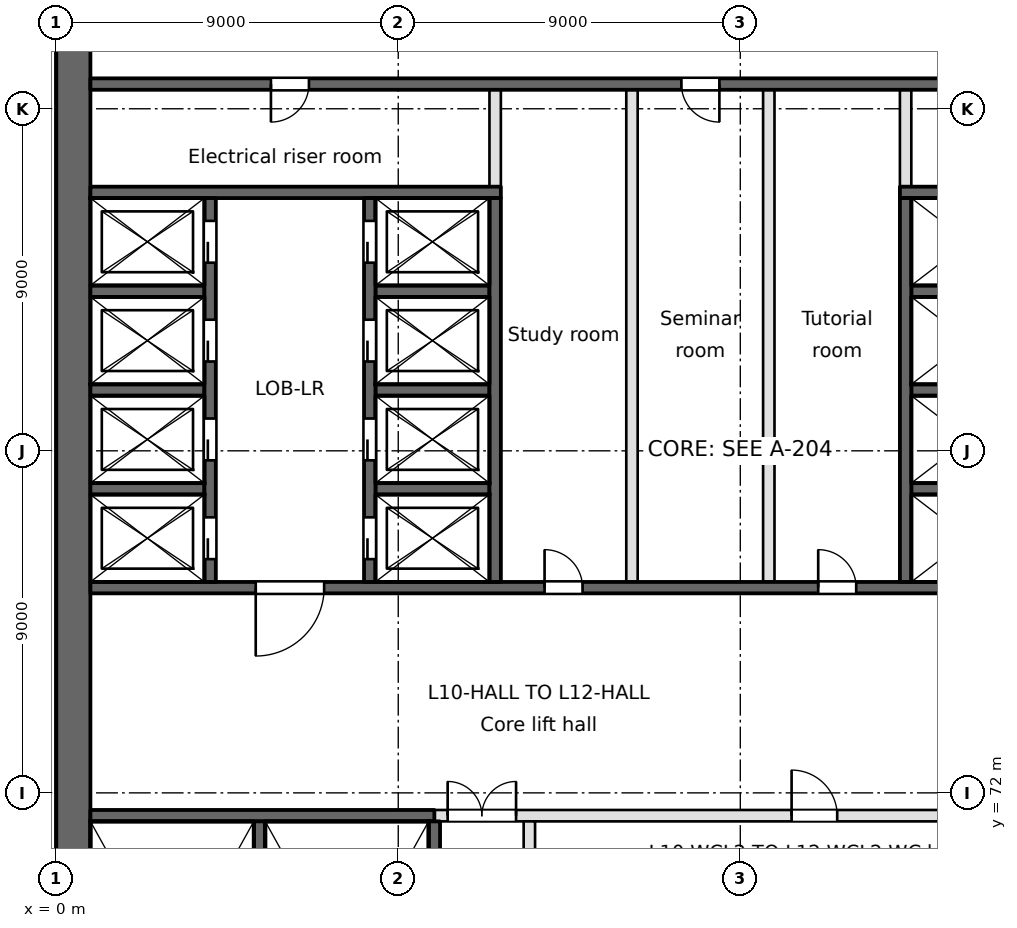
"""IFC4 building model, lengths in metres.
Left out: names, types, materials, properties, quantities, classifications, styles, units other than length and angle.
Written with IfcOpenShell. Run it as: python <this file> out.ifc"""

import sys

from ifc_helpers import new_model, si_unit, direction, frame, frame_2d, origin, place, context, subcontext, project, spatial, rectangle, extrude, element, fill, save


model = new_model("IFC4")
c1 = context("Model", 3, precision=1e-05, world=origin(), true_north=direction((0.0, 1.0)))
c2 = subcontext(c1, "Body", "Model", "MODEL_VIEW")
j1 = project(units=[si_unit("LENGTHUNIT", "METRE"), si_unit("PLANEANGLEUNIT", "RADIAN")], contexts=[c1])
p1 = place(None, origin())
s1 = spatial("IfcSite", under=j1, at=p1, CompositionType="ELEMENT")
p2 = place(p1, origin())
s2 = spatial("IfcBuilding", under=s1, at=p2, CompositionType="ELEMENT")
p3 = place(p2, frame((0.0, 0.0, 46.9)))
s3 = spatial("IfcBuildingStorey", under=s2, at=p3, CompositionType="ELEMENT", Elevation=46.9)
p4 = place(p3, frame((0.45, 94.5, 0.0), z_axis=(0.0, 0.0, 1.0), x_axis=(0.0, -1.0, 0.0)))
e1 = element("IfcWall", 1, at=p4, inside=s3, PredefinedType="SHEAR", context=c2, shape_type="SweptSolid", body=[
    extrude(rectangle(XDim=66.187, YDim=0.9, at=frame_2d((33.094, 0.0))), origin(), (0.0, 0.0, 1.0), 3.7),
])
p5 = place(p3, frame((0.9, 71.4, -0.4), z_axis=(0.0, 0.0, 1.0), x_axis=(1.0, 0.0, 0.0)))
e2 = element("IfcWall", 2, at=p5, inside=s3, PredefinedType="SOLIDWALL", context=c2, shape_type="SweptSolid", body=[
    extrude(rectangle(XDim=9.05, YDim=0.3, at=frame_2d((4.525, 0.0))), origin(), (0.0, 0.0, 1.0), 3.7),
])
p6 = place(p3, frame((9.95, 71.4, 0.0), z_axis=(0.0, 0.0, 1.0), x_axis=(1.0, 0.0, 0.0)))
e3 = element("IfcWall", 3, at=p6, inside=s3, PredefinedType="PARTITIONING", context=c2, shape_type="SweptSolid", body=[
    extrude(rectangle(XDim=17.65, YDim=0.3, at=frame_2d((8.825, 0.0))), origin(), (0.0, 0.0, 1.0), 3.3),
])
p7 = place(p6, frame((0.35, 0.0, 0.0)))
e4 = element("IfcOpeningElement", 4, at=p7, cuts=e3, PredefinedType="OPENING", context=c2, shape_type="SweptSolid", body=[
    extrude(rectangle(XDim=1.8, YDim=2.1, at=frame_2d((0.9, 1.05))), frame((0.0, 0.15, 0.0), z_axis=(0.0, -1.0, 0.0), x_axis=(1.0, 0.0, 0.0)), (0.0, 0.0, 1.0), 0.3),
])
p8 = place(p6, frame((9.4, 0.0, 0.0)))
e5 = element("IfcOpeningElement", 5, at=p8, cuts=e3, PredefinedType="OPENING", context=c2, shape_type="SweptSolid", body=[
    extrude(rectangle(XDim=1.2, YDim=2.1, at=frame_2d((0.6, 1.05))), frame((0.0, 0.15, 0.0), z_axis=(0.0, -1.0, 0.0), x_axis=(1.0, 0.0, 0.0)), (0.0, 0.0, 1.0), 0.3),
])
p9 = place(p3, frame((0.9, 77.4, -0.4), z_axis=(0.0, 0.0, 1.0), x_axis=(1.0, 0.0, 0.0)))
e6 = element("IfcWall", 6, at=p9, inside=s3, PredefinedType="SOLIDWALL", context=c2, shape_type="SweptSolid", body=[
    extrude(rectangle(XDim=28.95, YDim=0.3, at=frame_2d((14.475, 0.0))), origin(), (0.0, 0.0, 1.0), 3.7),
])
p10 = place(p9, frame((4.35, 0.0, 0.4)))
e7 = element("IfcOpeningElement", 7, at=p10, cuts=e6, PredefinedType="OPENING", context=c2, shape_type="SweptSolid", body=[
    extrude(rectangle(XDim=1.8, YDim=2.1, at=frame_2d((0.9, 1.05))), frame((0.0, 0.15, 0.0), z_axis=(0.0, -1.0, 0.0), x_axis=(1.0, 0.0, 0.0)), (0.0, 0.0, 1.0), 0.3),
])
p11 = place(p9, frame((25.95, 0.0, 0.4)))
e8 = element("IfcOpeningElement", 8, at=p11, cuts=e6, PredefinedType="OPENING", context=c2, shape_type="SweptSolid", body=[
    extrude(rectangle(XDim=1.8, YDim=2.1, at=frame_2d((0.9, 1.05))), frame((0.0, 0.15, 0.0), z_axis=(0.0, -1.0, 0.0), x_axis=(1.0, 0.0, 0.0)), (0.0, 0.0, 1.0), 0.3),
])
p12 = place(p9, frame((11.95, 0.0, 0.4)))
e9 = element("IfcOpeningElement", 9, at=p12, cuts=e6, PredefinedType="OPENING", context=c2, shape_type="SweptSolid", body=[
    extrude(rectangle(XDim=1.0, YDim=2.1, at=frame_2d((0.5, 1.05))), frame((0.0, 0.15, 0.0), z_axis=(0.0, -1.0, 0.0), x_axis=(1.0, 0.0, 0.0)), (0.0, 0.0, 1.0), 0.3),
])
p13 = place(p9, frame((19.15, 0.0, 0.4)))
e10 = element("IfcOpeningElement", 10, at=p13, cuts=e6, PredefinedType="OPENING", context=c2, shape_type="SweptSolid", body=[
    extrude(rectangle(XDim=1.0, YDim=2.1, at=frame_2d((0.5, 1.05))), frame((0.0, 0.15, 0.0), z_axis=(0.0, -1.0, 0.0), x_axis=(1.0, 0.0, 0.0)), (0.0, 0.0, 1.0), 0.3),
])
for number, where, z_axis, x_axis in (
    (11, (0.9, 80.0, -0.4), (0.0, 0.0, 1.0), (1.0, 0.0, 0.0)),
    (12, (8.4, 80.0, -0.4), (0.0, 0.0, 1.0), (1.0, 0.0, 0.0)),
    (13, (22.5, 80.0, -0.4), (0.0, 0.0, 1.0), (1.0, 0.0, 0.0)),
    (14, (0.9, 82.6, -0.4), (0.0, 0.0, 1.0), (1.0, 0.0, 0.0)),
    (15, (8.4, 82.6, -0.4), (0.0, 0.0, 1.0), (1.0, 0.0, 0.0)),
    (16, (22.5, 82.6, -0.4), (0.0, 0.0, 1.0), (1.0, 0.0, 0.0)),
    (17, (0.9, 85.2, -0.4), (0.0, 0.0, 1.0), (1.0, 0.0, 0.0)),
    (18, (8.4, 85.2, -0.4), (0.0, 0.0, 1.0), (1.0, 0.0, 0.0)),
    (19, (22.5, 85.2, -0.4), (0.0, 0.0, 1.0), (1.0, 0.0, 0.0)),
):
    element("IfcWall", number, at=place(p3, frame(where, z_axis=z_axis, x_axis=x_axis)), inside=s3, PredefinedType="SOLIDWALL", context=c2, shape_type="SweptSolid", body=[
        extrude(rectangle(XDim=3.0, YDim=0.3, at=frame_2d((1.5, 0.0))), origin(), (0.0, 0.0, 1.0), 3.7),
    ])
p14 = place(p3, frame((0.9, 87.8, -0.4), z_axis=(0.0, 0.0, 1.0), x_axis=(1.0, 0.0, 0.0)))
e20 = element("IfcWall", 20, at=p14, inside=s3, PredefinedType="SOLIDWALL", context=c2, shape_type="SweptSolid", body=[
    extrude(rectangle(XDim=10.8, YDim=0.3, at=frame_2d((5.4, 0.0))), origin(), (0.0, 0.0, 1.0), 3.7),
])
p15 = place(p3, frame((22.2, 87.8, -0.4), z_axis=(0.0, 0.0, 1.0), x_axis=(1.0, 0.0, 0.0)))
e21 = element("IfcWall", 21, at=p15, inside=s3, PredefinedType="SOLIDWALL", context=c2, shape_type="SweptSolid", body=[
    extrude(rectangle(XDim=7.8, YDim=0.3, at=frame_2d((3.9, 0.0))), origin(), (0.0, 0.0, 1.0), 3.7),
])
p16 = place(p3, frame((0.9, 90.65, -0.4), z_axis=(0.0, 0.0, 1.0), x_axis=(1.0, 0.0, 0.0)))
e22 = element("IfcWall", 22, at=p16, inside=s3, PredefinedType="SOLIDWALL", context=c2, shape_type="SweptSolid", body=[
    extrude(rectangle(XDim=34.6, YDim=0.3, at=frame_2d((17.3, 0.0))), origin(), (0.0, 0.0, 1.0), 3.7),
])
p17 = place(p16, frame((4.75, 0.0, 0.4)))
e23 = element("IfcOpeningElement", 23, at=p17, cuts=e22, PredefinedType="OPENING", context=c2, shape_type="SweptSolid", body=[
    extrude(rectangle(XDim=1.0, YDim=2.1, at=frame_2d((0.5, 1.05))), frame((0.0, 0.15, 0.0), z_axis=(0.0, -1.0, 0.0), x_axis=(1.0, 0.0, 0.0)), (0.0, 0.0, 1.0), 0.3),
])
p18 = place(p16, frame((24.7, 0.0, 0.4)))
e24 = element("IfcOpeningElement", 24, at=p18, cuts=e22, PredefinedType="OPENING", context=c2, shape_type="SweptSolid", body=[
    extrude(rectangle(XDim=1.0, YDim=2.1, at=frame_2d((0.5, 1.05))), frame((0.0, 0.15, 0.0), z_axis=(0.0, -1.0, 0.0), x_axis=(1.0, 0.0, 0.0)), (0.0, 0.0, 1.0), 0.3),
])
p19 = place(p16, frame((15.55, 0.0, 0.4)))
e25 = element("IfcOpeningElement", 25, at=p19, cuts=e22, PredefinedType="OPENING", context=c2, shape_type="SweptSolid", body=[
    extrude(rectangle(XDim=1.0, YDim=2.1, at=frame_2d((0.5, 1.05))), frame((0.0, 0.15, 0.0), z_axis=(0.0, -1.0, 0.0), x_axis=(1.0, 0.0, 0.0)), (0.0, 0.0, 1.0), 0.3),
])
p20 = place(p16, frame((31.4, 0.0, 0.4)))
e26 = element("IfcOpeningElement", 26, at=p20, cuts=e22, PredefinedType="OPENING", context=c2, shape_type="SweptSolid", body=[
    extrude(rectangle(XDim=1.0, YDim=2.1, at=frame_2d((0.5, 1.05))), frame((0.0, 0.15, 0.0), z_axis=(0.0, -1.0, 0.0), x_axis=(1.0, 0.0, 0.0)), (0.0, 0.0, 1.0), 0.3),
])
p21 = place(p3, frame((4.05, 77.55, -0.4), z_axis=(0.0, 0.0, 1.0), x_axis=(0.0, 1.0, 0.0)))
e27 = element("IfcWall", 27, at=p21, inside=s3, PredefinedType="SOLIDWALL", context=c2, shape_type="SweptSolid", body=[
    extrude(rectangle(XDim=10.1, YDim=0.3, at=frame_2d((5.05, 0.0))), origin(), (0.0, 0.0, 1.0), 3.7),
])
p22 = place(p21, frame((0.6, 0.0, 0.4)))
e28 = element("IfcOpeningElement", 28, at=p22, cuts=e27, PredefinedType="OPENING", context=c2, shape_type="SweptSolid", body=[
    extrude(rectangle(XDim=1.1, YDim=2.1, at=frame_2d((0.55, 1.05))), frame((0.0, 0.15, 0.0), z_axis=(0.0, -1.0, 0.0), x_axis=(1.0, 0.0, 0.0)), (0.0, 0.0, 1.0), 0.3),
])
p23 = place(p21, frame((3.2, 0.0, 0.4)))
e29 = element("IfcOpeningElement", 29, at=p23, cuts=e27, PredefinedType="OPENING", context=c2, shape_type="SweptSolid", body=[
    extrude(rectangle(XDim=1.1, YDim=2.1, at=frame_2d((0.55, 1.05))), frame((0.0, 0.15, 0.0), z_axis=(0.0, -1.0, 0.0), x_axis=(1.0, 0.0, 0.0)), (0.0, 0.0, 1.0), 0.3),
])
p24 = place(p21, frame((5.8, 0.0, 0.4)))
e30 = element("IfcOpeningElement", 30, at=p24, cuts=e27, PredefinedType="OPENING", context=c2, shape_type="SweptSolid", body=[
    extrude(rectangle(XDim=1.1, YDim=2.1, at=frame_2d((0.55, 1.05))), frame((0.0, 0.15, 0.0), z_axis=(0.0, -1.0, 0.0), x_axis=(1.0, 0.0, 0.0)), (0.0, 0.0, 1.0), 0.3),
])
p25 = place(p21, frame((8.4, 0.0, 0.4)))
e31 = element("IfcOpeningElement", 31, at=p25, cuts=e27, PredefinedType="OPENING", context=c2, shape_type="SweptSolid", body=[
    extrude(rectangle(XDim=1.1, YDim=2.1, at=frame_2d((0.55, 1.05))), frame((0.0, 0.15, 0.0), z_axis=(0.0, -1.0, 0.0), x_axis=(1.0, 0.0, 0.0)), (0.0, 0.0, 1.0), 0.3),
])
p26 = place(p3, frame((5.35, 63.5, -0.4), z_axis=(0.0, 0.0, 1.0), x_axis=(0.0, 1.0, 0.0)))
e32 = element("IfcWall", 32, at=p26, inside=s3, PredefinedType="SOLIDWALL", context=c2, shape_type="SweptSolid", body=[
    extrude(rectangle(XDim=7.75, YDim=0.3, at=frame_2d((3.875, 0.0))), origin(), (0.0, 0.0, 1.0), 3.7),
])
p27 = place(p3, frame((8.25, 77.55, -0.4), z_axis=(0.0, 0.0, 1.0), x_axis=(0.0, 1.0, 0.0)))
e33 = element("IfcWall", 33, at=p27, inside=s3, PredefinedType="SOLIDWALL", context=c2, shape_type="SweptSolid", body=[
    extrude(rectangle(XDim=10.1, YDim=0.3, at=frame_2d((5.05, 0.0))), origin(), (0.0, 0.0, 1.0), 3.7),
])
p28 = place(p27, frame((0.6, 0.0, 0.4)))
e34 = element("IfcOpeningElement", 34, at=p28, cuts=e33, PredefinedType="OPENING", context=c2, shape_type="SweptSolid", body=[
    extrude(rectangle(XDim=1.1, YDim=2.1, at=frame_2d((0.55, 1.05))), frame((0.0, 0.15, 0.0), z_axis=(0.0, -1.0, 0.0), x_axis=(1.0, 0.0, 0.0)), (0.0, 0.0, 1.0), 0.3),
])
p29 = place(p27, frame((3.2, 0.0, 0.4)))
e35 = element("IfcOpeningElement", 35, at=p29, cuts=e33, PredefinedType="OPENING", context=c2, shape_type="SweptSolid", body=[
    extrude(rectangle(XDim=1.1, YDim=2.1, at=frame_2d((0.55, 1.05))), frame((0.0, 0.15, 0.0), z_axis=(0.0, -1.0, 0.0), x_axis=(1.0, 0.0, 0.0)), (0.0, 0.0, 1.0), 0.3),
])
p30 = place(p27, frame((5.8, 0.0, 0.4)))
e36 = element("IfcOpeningElement", 36, at=p30, cuts=e33, PredefinedType="OPENING", context=c2, shape_type="SweptSolid", body=[
    extrude(rectangle(XDim=1.1, YDim=2.1, at=frame_2d((0.55, 1.05))), frame((0.0, 0.15, 0.0), z_axis=(0.0, -1.0, 0.0), x_axis=(1.0, 0.0, 0.0)), (0.0, 0.0, 1.0), 0.3),
])
p31 = place(p27, frame((8.4, 0.0, 0.4)))
e37 = element("IfcOpeningElement", 37, at=p31, cuts=e33, PredefinedType="OPENING", context=c2, shape_type="SweptSolid", body=[
    extrude(rectangle(XDim=1.1, YDim=2.1, at=frame_2d((0.55, 1.05))), frame((0.0, 0.15, 0.0), z_axis=(0.0, -1.0, 0.0), x_axis=(1.0, 0.0, 0.0)), (0.0, 0.0, 1.0), 0.3),
])
p32 = place(p3, frame((9.95, 63.5, -0.4), z_axis=(0.0, 0.0, 1.0), x_axis=(0.0, 1.0, 0.0)))
e38 = element("IfcWall", 38, at=p32, inside=s3, PredefinedType="SOLIDWALL", context=c2, shape_type="SweptSolid", body=[
    extrude(rectangle(XDim=7.75, YDim=0.3, at=frame_2d((3.875, 0.0))), origin(), (0.0, 0.0, 1.0), 3.7),
])
p33 = place(p3, frame((11.55, 77.55, -0.4), z_axis=(0.0, 0.0, 1.0), x_axis=(0.0, 1.0, 0.0)))
e39 = element("IfcWall", 39, at=p33, inside=s3, PredefinedType="SOLIDWALL", context=c2, shape_type="SweptSolid", body=[
    extrude(rectangle(XDim=10.1, YDim=0.3, at=frame_2d((5.05, 0.0))), origin(), (0.0, 0.0, 1.0), 3.7),
])
p34 = place(p3, frame((11.55, 87.95, 0.0), z_axis=(0.0, 0.0, 1.0), x_axis=(0.0, 1.0, 0.0)))
e40 = element("IfcWall", 40, at=p34, inside=s3, PredefinedType="PARTITIONING", context=c2, shape_type="SweptSolid", body=[
    extrude(rectangle(XDim=2.55, YDim=0.3, at=frame_2d((1.275, 0.0))), origin(), (0.0, 0.0, 1.0), 3.3),
])
p35 = place(p3, frame((12.45, 63.5, 0.0), z_axis=(0.0, 0.0, 1.0), x_axis=(0.0, 1.0, 0.0)))
e41 = element("IfcWall", 41, at=p35, inside=s3, PredefinedType="PARTITIONING", context=c2, shape_type="SweptSolid", body=[
    extrude(rectangle(XDim=7.75, YDim=0.3, at=frame_2d((3.875, 0.0))), origin(), (0.0, 0.0, 1.0), 3.3),
])
for number, where, z_axis, x_axis in (
    (42, (15.15, 77.55, 0.0), (0.0, 0.0, 1.0), (0.0, 1.0, 0.0)),
    (43, (18.75, 77.55, 0.0), (0.0, 0.0, 1.0), (0.0, 1.0, 0.0)),
):
    element("IfcWall", number, at=place(p3, frame(where, z_axis=z_axis, x_axis=x_axis)), inside=s3, PredefinedType="PARTITIONING", context=c2, shape_type="SweptSolid", body=[
        extrude(rectangle(XDim=12.95, YDim=0.3, at=frame_2d((6.475, 0.0))), origin(), (0.0, 0.0, 1.0), 3.3),
    ])
p36 = place(p3, frame((22.35, 77.55, -0.4), z_axis=(0.0, 0.0, 1.0), x_axis=(0.0, 1.0, 0.0)))
e44 = element("IfcWall", 44, at=p36, inside=s3, PredefinedType="SOLIDWALL", context=c2, shape_type="SweptSolid", body=[
    extrude(rectangle(XDim=10.1, YDim=0.3, at=frame_2d((5.05, 0.0))), origin(), (0.0, 0.0, 1.0), 3.7),
])
p37 = place(p3, frame((22.35, 87.95, 0.0), z_axis=(0.0, 0.0, 1.0), x_axis=(0.0, 1.0, 0.0)))
e45 = element("IfcWall", 45, at=p37, inside=s3, PredefinedType="PARTITIONING", context=c2, shape_type="SweptSolid", body=[
    extrude(rectangle(XDim=2.55, YDim=0.3, at=frame_2d((1.275, 0.0))), origin(), (0.0, 0.0, 1.0), 3.3),
])
p38 = place(p22, origin())
e46 = element("IfcDoor", 46, at=p38, inside=s3, OperationType="SLIDING_TO_RIGHT", PredefinedType="DOOR", context=c2, shape_type="SweptSolid", body=[
    extrude(rectangle(XDim=1.1, YDim=2.1, at=frame_2d((0.55, 1.05))), frame((0.0, 0.025, 0.0), z_axis=(0.0, -1.0, 0.0), x_axis=(1.0, 0.0, 0.0)), (0.0, 0.0, 1.0), 0.05),
])
fill(e28, e46)
p39 = place(p23, origin())
e47 = element("IfcDoor", 47, at=p39, inside=s3, OperationType="SLIDING_TO_LEFT", PredefinedType="DOOR", context=c2, shape_type="SweptSolid", body=[
    extrude(rectangle(XDim=1.1, YDim=2.1, at=frame_2d((0.55, 1.05))), frame((0.0, 0.025, 0.0), z_axis=(0.0, -1.0, 0.0), x_axis=(1.0, 0.0, 0.0)), (0.0, 0.0, 1.0), 0.05),
])
fill(e29, e47)
p40 = place(p24, origin())
e48 = element("IfcDoor", 48, at=p40, inside=s3, OperationType="SLIDING_TO_RIGHT", PredefinedType="DOOR", context=c2, shape_type="SweptSolid", body=[
    extrude(rectangle(XDim=1.1, YDim=2.1, at=frame_2d((0.55, 1.05))), frame((0.0, 0.025, 0.0), z_axis=(0.0, -1.0, 0.0), x_axis=(1.0, 0.0, 0.0)), (0.0, 0.0, 1.0), 0.05),
])
fill(e30, e48)
p41 = place(p25, origin())
e49 = element("IfcDoor", 49, at=p41, inside=s3, OperationType="SLIDING_TO_LEFT", PredefinedType="DOOR", context=c2, shape_type="SweptSolid", body=[
    extrude(rectangle(XDim=1.1, YDim=2.1, at=frame_2d((0.55, 1.05))), frame((0.0, 0.025, 0.0), z_axis=(0.0, -1.0, 0.0), x_axis=(1.0, 0.0, 0.0)), (0.0, 0.0, 1.0), 0.05),
])
fill(e31, e49)
p42 = place(p28, origin())
e50 = element("IfcDoor", 50, at=p42, inside=s3, OperationType="SLIDING_TO_RIGHT", PredefinedType="DOOR", context=c2, shape_type="SweptSolid", body=[
    extrude(rectangle(XDim=1.1, YDim=2.1, at=frame_2d((0.55, 1.05))), frame((0.0, 0.025, 0.0), z_axis=(0.0, -1.0, 0.0), x_axis=(1.0, 0.0, 0.0)), (0.0, 0.0, 1.0), 0.05),
])
fill(e34, e50)
p43 = place(p29, origin())
e51 = element("IfcDoor", 51, at=p43, inside=s3, OperationType="SLIDING_TO_LEFT", PredefinedType="DOOR", context=c2, shape_type="SweptSolid", body=[
    extrude(rectangle(XDim=1.1, YDim=2.1, at=frame_2d((0.55, 1.05))), frame((0.0, 0.025, 0.0), z_axis=(0.0, -1.0, 0.0), x_axis=(1.0, 0.0, 0.0)), (0.0, 0.0, 1.0), 0.05),
])
fill(e35, e51)
p44 = place(p30, origin())
e52 = element("IfcDoor", 52, at=p44, inside=s3, OperationType="SLIDING_TO_RIGHT", PredefinedType="DOOR", context=c2, shape_type="SweptSolid", body=[
    extrude(rectangle(XDim=1.1, YDim=2.1, at=frame_2d((0.55, 1.05))), frame((0.0, 0.025, 0.0), z_axis=(0.0, -1.0, 0.0), x_axis=(1.0, 0.0, 0.0)), (0.0, 0.0, 1.0), 0.05),
])
fill(e36, e52)
p45 = place(p31, origin())
e53 = element("IfcDoor", 53, at=p45, inside=s3, OperationType="SLIDING_TO_LEFT", PredefinedType="DOOR", context=c2, shape_type="SweptSolid", body=[
    extrude(rectangle(XDim=1.1, YDim=2.1, at=frame_2d((0.55, 1.05))), frame((0.0, 0.025, 0.0), z_axis=(0.0, -1.0, 0.0), x_axis=(1.0, 0.0, 0.0)), (0.0, 0.0, 1.0), 0.05),
])
fill(e37, e53)
p46 = place(p10, frame((1.8, 0.0, 0.0), z_axis=(0.0, 0.0, 1.0), x_axis=(-1.0, 0.0, 0.0)))
e54 = element("IfcDoor", 54, at=p46, inside=s3, OperationType="SINGLE_SWING_RIGHT", PredefinedType="DOOR", context=c2, shape_type="SweptSolid", body=[
    extrude(rectangle(XDim=1.8, YDim=2.1, at=frame_2d((0.9, 1.05))), frame((0.0, 0.025, 0.0), z_axis=(0.0, -1.0, 0.0), x_axis=(1.0, 0.0, 0.0)), (0.0, 0.0, 1.0), 0.05),
])
fill(e7, e54)
p47 = place(p7, origin())
e55 = element("IfcDoor", 55, at=p47, inside=s3, OperationType="DOUBLE_DOOR_SINGLE_SWING", PredefinedType="DOOR", context=c2, shape_type="SweptSolid", body=[
    extrude(rectangle(XDim=1.8, YDim=2.1, at=frame_2d((0.9, 1.05))), frame((0.0, 0.025, 0.0), z_axis=(0.0, -1.0, 0.0), x_axis=(1.0, 0.0, 0.0)), (0.0, 0.0, 1.0), 0.05),
])
fill(e4, e55)
p48 = place(p8, origin())
e56 = element("IfcDoor", 56, at=p48, inside=s3, OperationType="SINGLE_SWING_LEFT", PredefinedType="DOOR", context=c2, shape_type="SweptSolid", body=[
    extrude(rectangle(XDim=1.2, YDim=2.1, at=frame_2d((0.6, 1.05))), frame((0.0, 0.025, 0.0), z_axis=(0.0, -1.0, 0.0), x_axis=(1.0, 0.0, 0.0)), (0.0, 0.0, 1.0), 0.05),
])
fill(e5, e56)
p49 = place(p17, frame((1.0, 0.0, 0.0), z_axis=(0.0, 0.0, 1.0), x_axis=(-1.0, 0.0, 0.0)))
e57 = element("IfcDoor", 57, at=p49, inside=s3, OperationType="SINGLE_SWING_RIGHT", PredefinedType="DOOR", context=c2, shape_type="SweptSolid", body=[
    extrude(rectangle(XDim=1.0, YDim=2.1, at=frame_2d((0.5, 1.05))), frame((0.0, 0.025, 0.0), z_axis=(0.0, -1.0, 0.0), x_axis=(1.0, 0.0, 0.0)), (0.0, 0.0, 1.0), 0.05),
])
fill(e23, e57)
p50 = place(p12, origin())
e58 = element("IfcDoor", 58, at=p50, inside=s3, OperationType="SINGLE_SWING_LEFT", PredefinedType="DOOR", context=c2, shape_type="SweptSolid", body=[
    extrude(rectangle(XDim=1.0, YDim=2.1, at=frame_2d((0.5, 1.05))), frame((0.0, 0.025, 0.0), z_axis=(0.0, -1.0, 0.0), x_axis=(1.0, 0.0, 0.0)), (0.0, 0.0, 1.0), 0.05),
])
fill(e9, e58)
p51 = place(p19, frame((1.0, 0.0, 0.0), z_axis=(0.0, 0.0, 1.0), x_axis=(-1.0, 0.0, 0.0)))
e59 = element("IfcDoor", 59, at=p51, inside=s3, OperationType="SINGLE_SWING_LEFT", PredefinedType="DOOR", context=c2, shape_type="SweptSolid", body=[
    extrude(rectangle(XDim=1.0, YDim=2.1, at=frame_2d((0.5, 1.05))), frame((0.0, 0.025, 0.0), z_axis=(0.0, -1.0, 0.0), x_axis=(1.0, 0.0, 0.0)), (0.0, 0.0, 1.0), 0.05),
])
fill(e25, e59)
p52 = place(p13, origin())
e60 = element("IfcDoor", 60, at=p52, inside=s3, OperationType="SINGLE_SWING_LEFT", PredefinedType="DOOR", context=c2, shape_type="SweptSolid", body=[
    extrude(rectangle(XDim=1.0, YDim=2.1, at=frame_2d((0.5, 1.05))), frame((0.0, 0.025, 0.0), z_axis=(0.0, -1.0, 0.0), x_axis=(1.0, 0.0, 0.0)), (0.0, 0.0, 1.0), 0.05),
])
fill(e10, e60)
save(model, sys.argv[1])
